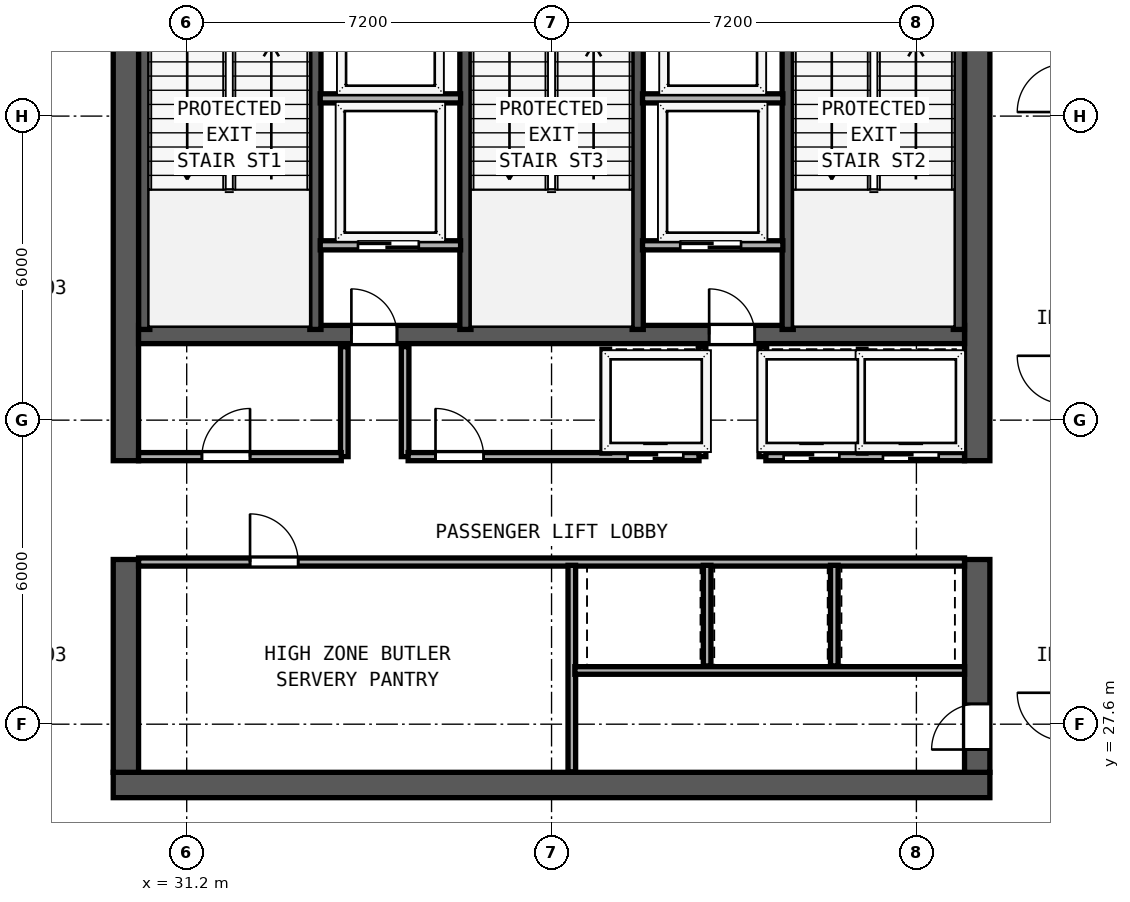
"""IFC4 building model, lengths in metres.
Left out: names, types, materials, properties, quantities, classifications, styles, units other than length and angle.
Written with IfcOpenShell. Run it as: python <this file> out.ifc"""

import sys

from ifc_helpers import new_model, si_unit, direction, frame, frame_2d, origin, place, context, subcontext, project, spatial, rectangle, extrude, element, fill, save


model = new_model("IFC4")
c1 = context("Model", 3, precision=1e-05, world=origin(), true_north=direction((0.0, 1.0)))
c2 = subcontext(c1, "Body", "Model", "MODEL_VIEW")
j1 = project(units=[si_unit("LENGTHUNIT", "METRE"), si_unit("PLANEANGLEUNIT", "RADIAN")], contexts=[c1])
p1 = place(None, origin())
s1 = spatial("IfcSite", under=j1, at=p1, CompositionType="ELEMENT")
p2 = place(p1, origin())
s2 = spatial("IfcBuilding", under=s1, at=p2, CompositionType="ELEMENT")
p3 = place(p2, frame((0.0, 0.0, 301.7)))
s3 = spatial("IfcBuildingStorey", under=s2, at=p3, CompositionType="ELEMENT", Elevation=301.7)
p4 = place(p3, frame((29.75, 26.4, 0.0), z_axis=(0.0, 0.0, 1.0), x_axis=(1.0, 0.0, 0.0)))
e1 = element("IfcWall", 1, at=p4, inside=s3, PredefinedType="SHEAR", context=c2, shape_type="SweptSolid", body=[
    extrude(rectangle(XDim=17.3, YDim=0.5, at=frame_2d((8.65, 0.0))), origin(), (0.0, 0.0, 1.0), 3.72),
])
p5 = place(p3, frame((30.0, 26.65, 0.0), z_axis=(0.0, 0.0, 1.0), x_axis=(0.0, 1.0, 0.0)))
e2 = element("IfcWall", 2, at=p5, inside=s3, PredefinedType="SHEAR", context=c2, shape_type="SweptSolid", body=[
    extrude(rectangle(XDim=4.2, YDim=0.5, at=frame_2d((2.1, 0.0))), origin(), (0.0, 0.0, 1.0), 3.72),
])
p6 = place(p3, frame((30.0, 32.8, 0.0), z_axis=(0.0, 0.0, 1.0), x_axis=(0.0, 1.0, 0.0)))
e3 = element("IfcWall", 3, at=p6, inside=s3, PredefinedType="SHEAR", context=c2, shape_type="SweptSolid", body=[
    extrude(rectangle(XDim=10.15, YDim=0.5, at=frame_2d((5.075, 0.0))), origin(), (0.0, 0.0, 1.0), 3.72),
])
p7 = place(p3, frame((46.8, 26.65, 0.0), z_axis=(0.0, 0.0, 1.0), x_axis=(0.0, 1.0, 0.0)))
e4 = element("IfcWall", 4, at=p7, inside=s3, PredefinedType="SHEAR", context=c2, shape_type="SweptSolid", body=[
    extrude(rectangle(XDim=4.2, YDim=0.5, at=frame_2d((2.1, 0.0))), origin(), (0.0, 0.0, 1.0), 3.72),
])
p8 = place(p7, frame((1.35, 0.0, 0.0), z_axis=(0.0, 0.0, 1.0), x_axis=(-1.0, 0.0, 0.0)))
e5 = element("IfcOpeningElement", 5, at=p8, cuts=e4, PredefinedType="OPENING", context=c2, shape_type="SweptSolid", body=[
    extrude(rectangle(XDim=0.9, YDim=2.1, at=frame_2d((0.45, 1.05))), frame((0.0, 0.26, 0.0), z_axis=(0.0, -1.0, 0.0), x_axis=(1.0, 0.0, 0.0)), (0.0, 0.0, 1.0), 0.52),
])
p9 = place(p3, frame((46.8, 32.8, 0.0), z_axis=(0.0, 0.0, 1.0), x_axis=(0.0, 1.0, 0.0)))
e6 = element("IfcWall", 6, at=p9, inside=s3, PredefinedType="SHEAR", context=c2, shape_type="SweptSolid", body=[
    extrude(rectangle(XDim=10.15, YDim=0.5, at=frame_2d((5.075, 0.0))), origin(), (0.0, 0.0, 1.0), 3.72),
])
p10 = place(p3, frame((30.25, 35.29, 0.0), z_axis=(0.0, 0.0, 1.0), x_axis=(1.0, 0.0, 0.0)))
e7 = element("IfcWall", 7, at=p10, inside=s3, PredefinedType="SHEAR", context=c2, shape_type="SweptSolid", body=[
    extrude(rectangle(XDim=16.3, YDim=0.36, at=frame_2d((8.15, 0.0))), origin(), (0.0, 0.0, 1.0), 3.72),
])
p11 = place(p10, frame((5.1, 0.0, 0.0), z_axis=(0.0, 0.0, 1.0), x_axis=(-1.0, 0.0, 0.0)))
e8 = element("IfcOpeningElement", 8, at=p11, cuts=e7, PredefinedType="OPENING", context=c2, shape_type="SweptSolid", body=[
    extrude(rectangle(XDim=0.9, YDim=2.1, at=frame_2d((0.45, 1.05))), frame((0.0, 0.19, 0.0), z_axis=(0.0, -1.0, 0.0), x_axis=(1.0, 0.0, 0.0)), (0.0, 0.0, 1.0), 0.38),
])
p12 = place(p10, frame((12.16, 0.0, 0.0), z_axis=(0.0, 0.0, 1.0), x_axis=(-1.0, 0.0, 0.0)))
e9 = element("IfcOpeningElement", 9, at=p12, cuts=e7, PredefinedType="OPENING", context=c2, shape_type="SweptSolid", body=[
    extrude(rectangle(XDim=0.9, YDim=2.1, at=frame_2d((0.45, 1.05))), frame((0.0, 0.19, 0.0), z_axis=(0.0, -1.0, 0.0), x_axis=(1.0, 0.0, 0.0)), (0.0, 0.0, 1.0), 0.38),
])
for number, where, z_axis, x_axis in (
    (10, (30.362, 35.39, 0.0), (0.0, 0.0, 1.0), (0.0, 1.0, 0.0)),
    (11, (33.74, 35.39, 0.0), (0.0, 0.0, 1.0), (0.0, 1.0, 0.0)),
    (12, (36.7, 35.39, 0.0), (0.0, 0.0, 1.0), (0.0, 1.0, 0.0)),
    (13, (40.1, 35.39, 0.0), (0.0, 0.0, 1.0), (0.0, 1.0, 0.0)),
    (14, (43.06, 35.39, 0.0), (0.0, 0.0, 1.0), (0.0, 1.0, 0.0)),
    (15, (46.438, 35.39, 0.0), (0.0, 0.0, 1.0), (0.0, 1.0, 0.0)),
):
    element("IfcWall", number, at=place(p3, frame(where, z_axis=z_axis, x_axis=x_axis)), inside=s3, PredefinedType="SHEAR", context=c2, shape_type="SweptSolid", body=[
        extrude(rectangle(XDim=7.56, YDim=0.22, at=frame_2d((3.78, 0.0))), origin(), (0.0, 0.0, 1.0), 3.72),
    ])
for number, where, z_axis, x_axis in (
    (16, (33.835, 39.95, 0.0), (0.0, 0.0, 1.0), (1.0, 0.0, 0.0)),
    (17, (40.195, 39.95, 0.0), (0.0, 0.0, 1.0), (1.0, 0.0, 0.0)),
):
    element("IfcWall", number, at=place(p3, frame(where, z_axis=z_axis, x_axis=x_axis)), inside=s3, PredefinedType="SOLIDWALL", context=c2, shape_type="SweptSolid", body=[
        extrude(rectangle(XDim=2.77, YDim=0.18, at=frame_2d((1.385, 0.0))), origin(), (0.0, 0.0, 1.0), 3.72),
    ])
p13 = place(p3, frame((33.835, 37.05, 0.0), z_axis=(0.0, 0.0, 1.0), x_axis=(1.0, 0.0, 0.0)))
e18 = element("IfcWall", 18, at=p13, inside=s3, PredefinedType="SOLIDWALL", context=c2, shape_type="SweptSolid", body=[
    extrude(rectangle(XDim=2.77, YDim=0.18, at=frame_2d((1.385, 0.0))), origin(), (0.0, 0.0, 1.0), 3.72),
])
p14 = place(p13, frame((1.945, 0.0, 0.0), z_axis=(0.0, 0.0, 1.0), x_axis=(-1.0, 0.0, 0.0)))
e19 = element("IfcOpeningElement", 19, at=p14, cuts=e18, PredefinedType="OPENING", context=c2, shape_type="SweptSolid", body=[
    extrude(rectangle(XDim=1.2, YDim=2.2, at=frame_2d((0.6, 1.1))), frame((0.0, 0.1, 0.0), z_axis=(0.0, -1.0, 0.0), x_axis=(1.0, 0.0, 0.0)), (0.0, 0.0, 1.0), 0.2),
])
for number, where, z_axis, x_axis in (
    (20, (34.31, 32.88, 0.0), (0.0, 0.0, 1.0), (0.0, 1.0, 0.0)),
    (21, (35.51, 32.88, 0.0), (0.0, 0.0, 1.0), (0.0, 1.0, 0.0)),
):
    element("IfcWall", number, at=place(p3, frame(where, z_axis=z_axis, x_axis=x_axis)), inside=s3, PredefinedType="SOLIDWALL", context=c2, shape_type="SweptSolid", body=[
        extrude(rectangle(XDim=2.17, YDim=0.15, at=frame_2d((1.085, 0.0))), origin(), (0.0, 0.0, 1.0), 3.72),
    ])
p15 = place(p3, frame((40.195, 37.05, 0.0), z_axis=(0.0, 0.0, 1.0), x_axis=(1.0, 0.0, 0.0)))
e22 = element("IfcWall", 22, at=p15, inside=s3, PredefinedType="SOLIDWALL", context=c2, shape_type="SweptSolid", body=[
    extrude(rectangle(XDim=2.77, YDim=0.18, at=frame_2d((1.385, 0.0))), origin(), (0.0, 0.0, 1.0), 3.72),
])
p16 = place(p15, frame((1.945, 0.0, 0.0), z_axis=(0.0, 0.0, 1.0), x_axis=(-1.0, 0.0, 0.0)))
e23 = element("IfcOpeningElement", 23, at=p16, cuts=e22, PredefinedType="OPENING", context=c2, shape_type="SweptSolid", body=[
    extrude(rectangle(XDim=1.2, YDim=2.2, at=frame_2d((0.6, 1.1))), frame((0.0, 0.1, 0.0), z_axis=(0.0, -1.0, 0.0), x_axis=(1.0, 0.0, 0.0)), (0.0, 0.0, 1.0), 0.2),
])
for number, where, z_axis, x_axis in (
    (24, (41.37, 32.88, 0.0), (0.0, 0.0, 1.0), (0.0, 1.0, 0.0)),
    (25, (42.57, 32.88, 0.0), (0.0, 0.0, 1.0), (0.0, 1.0, 0.0)),
):
    element("IfcWall", number, at=place(p3, frame(where, z_axis=z_axis, x_axis=x_axis)), inside=s3, PredefinedType="SOLIDWALL", context=c2, shape_type="SweptSolid", body=[
        extrude(rectangle(XDim=2.17, YDim=0.15, at=frame_2d((1.085, 0.0))), origin(), (0.0, 0.0, 1.0), 3.72),
    ])
p17 = place(p3, frame((30.25, 32.88, 0.0), z_axis=(0.0, 0.0, 1.0), x_axis=(1.0, 0.0, 0.0)))
e26 = element("IfcWall", 26, at=p17, inside=s3, PredefinedType="SOLIDWALL", context=c2, shape_type="SweptSolid", body=[
    extrude(rectangle(XDim=4.0, YDim=0.16, at=frame_2d((2.0, 0.0))), origin(), (0.0, 0.0, 1.0), 3.72),
])
p18 = place(p17, frame((2.2, 0.0, 0.0), z_axis=(0.0, 0.0, 1.0), x_axis=(-1.0, 0.0, 0.0)))
e27 = element("IfcOpeningElement", 27, at=p18, cuts=e26, PredefinedType="OPENING", context=c2, shape_type="SweptSolid", body=[
    extrude(rectangle(XDim=0.95, YDim=2.12, at=frame_2d((0.475, 1.06))), frame((0.0, 0.09, 0.0), z_axis=(0.0, -1.0, 0.0), x_axis=(1.0, 0.0, 0.0)), (0.0, 0.0, 1.0), 0.18),
])
p19 = place(p3, frame((35.57, 32.88, 0.0), z_axis=(0.0, 0.0, 1.0), x_axis=(1.0, 0.0, 0.0)))
e28 = element("IfcWall", 28, at=p19, inside=s3, PredefinedType="SOLIDWALL", context=c2, shape_type="SweptSolid", body=[
    extrude(rectangle(XDim=5.74, YDim=0.16, at=frame_2d((2.87, 0.0))), origin(), (0.0, 0.0, 1.0), 3.72),
])
p20 = place(p19, frame((1.49, 0.0, 0.0), z_axis=(0.0, 0.0, 1.0), x_axis=(-1.0, 0.0, 0.0)))
e29 = element("IfcOpeningElement", 29, at=p20, cuts=e28, PredefinedType="OPENING", context=c2, shape_type="SweptSolid", body=[
    extrude(rectangle(XDim=0.95, YDim=2.12, at=frame_2d((0.475, 1.06))), frame((0.0, 0.09, 0.0), z_axis=(0.0, -1.0, 0.0), x_axis=(1.0, 0.0, 0.0)), (0.0, 0.0, 1.0), 0.18),
])
p21 = place(p19, frame((5.43, 0.0, 0.0), z_axis=(0.0, 0.0, 1.0), x_axis=(-1.0, 0.0, 0.0)))
e30 = element("IfcOpeningElement", 30, at=p21, cuts=e28, PredefinedType="OPENING", context=c2, shape_type="SweptSolid", body=[
    extrude(rectangle(XDim=1.1, YDim=2.2, at=frame_2d((0.55, 1.1))), frame((0.0, 0.09, 0.0), z_axis=(0.0, -1.0, 0.0), x_axis=(1.0, 0.0, 0.0)), (0.0, 0.0, 1.0), 0.18),
])
p22 = place(p3, frame((42.63, 32.88, 0.0), z_axis=(0.0, 0.0, 1.0), x_axis=(1.0, 0.0, 0.0)))
e31 = element("IfcWall", 31, at=p22, inside=s3, PredefinedType="SOLIDWALL", context=c2, shape_type="SweptSolid", body=[
    extrude(rectangle(XDim=3.92, YDim=0.16, at=frame_2d((1.96, 0.0))), origin(), (0.0, 0.0, 1.0), 3.72),
])
p23 = place(p22, frame((1.45, 0.0, 0.0), z_axis=(0.0, 0.0, 1.0), x_axis=(-1.0, 0.0, 0.0)))
e32 = element("IfcOpeningElement", 32, at=p23, cuts=e31, PredefinedType="OPENING", context=c2, shape_type="SweptSolid", body=[
    extrude(rectangle(XDim=1.1, YDim=2.2, at=frame_2d((0.55, 1.1))), frame((0.0, 0.09, 0.0), z_axis=(0.0, -1.0, 0.0), x_axis=(1.0, 0.0, 0.0)), (0.0, 0.0, 1.0), 0.18),
])
p24 = place(p22, frame((3.41, 0.0, 0.0), z_axis=(0.0, 0.0, 1.0), x_axis=(-1.0, 0.0, 0.0)))
e33 = element("IfcOpeningElement", 33, at=p24, cuts=e31, PredefinedType="OPENING", context=c2, shape_type="SweptSolid", body=[
    extrude(rectangle(XDim=1.1, YDim=2.2, at=frame_2d((0.55, 1.1))), frame((0.0, 0.09, 0.0), z_axis=(0.0, -1.0, 0.0), x_axis=(1.0, 0.0, 0.0)), (0.0, 0.0, 1.0), 0.18),
])
for number, where, z_axis, x_axis in (
    (34, (39.47, 32.95, 0.0), (0.0, 0.0, 1.0), (0.0, 1.0, 0.0)),
    (35, (44.53, 32.95, 0.0), (0.0, 0.0, 1.0), (0.0, 1.0, 0.0)),
):
    element("IfcWall", number, at=place(p3, frame(where, z_axis=z_axis, x_axis=x_axis)), inside=s3, PredefinedType="SOLIDWALL", context=c2, shape_type="SweptSolid", body=[
        extrude(rectangle(XDim=2.05, YDim=0.15, at=frame_2d((1.025, 0.0))), origin(), (0.0, 0.0, 1.0), 3.72),
    ])
p25 = place(p3, frame((30.25, 30.8, 0.0), z_axis=(0.0, 0.0, 1.0), x_axis=(1.0, 0.0, 0.0)))
e36 = element("IfcWall", 36, at=p25, inside=s3, PredefinedType="SOLIDWALL", context=c2, shape_type="SweptSolid", body=[
    extrude(rectangle(XDim=16.3, YDim=0.16, at=frame_2d((8.15, 0.0))), origin(), (0.0, 0.0, 1.0), 3.72),
])
p26 = place(p25, frame((2.2, 0.0, 0.0)))
e37 = element("IfcOpeningElement", 37, at=p26, cuts=e36, PredefinedType="OPENING", context=c2, shape_type="SweptSolid", body=[
    extrude(rectangle(XDim=0.95, YDim=2.12, at=frame_2d((0.475, 1.06))), frame((0.0, 0.09, 0.0), z_axis=(0.0, -1.0, 0.0), x_axis=(1.0, 0.0, 0.0)), (0.0, 0.0, 1.0), 0.18),
])
p27 = place(p3, frame((38.8, 26.66, 0.0), z_axis=(0.0, 0.0, 1.0), x_axis=(0.0, 1.0, 0.0)))
e38 = element("IfcWall", 38, at=p27, inside=s3, PredefinedType="SOLIDWALL", context=c2, shape_type="SweptSolid", body=[
    extrude(rectangle(XDim=4.075, YDim=0.15, at=frame_2d((2.038, 0.0))), origin(), (0.0, 0.0, 1.0), 3.72),
])
p28 = place(p3, frame((38.86, 28.66, 0.0), z_axis=(0.0, 0.0, 1.0), x_axis=(1.0, 0.0, 0.0)))
e39 = element("IfcWall", 39, at=p28, inside=s3, PredefinedType="PARTITIONING", context=c2, shape_type="SweptSolid", body=[
    extrude(rectangle(XDim=7.69, YDim=0.15, at=frame_2d((3.845, 0.0))), origin(), (0.0, 0.0, 1.0), 3.72),
])
for number, where, z_axis, x_axis in (
    (40, (41.47, 28.75, 0.0), (0.0, 0.0, 1.0), (0.0, 1.0, 0.0)),
    (41, (43.98, 28.75, 0.0), (0.0, 0.0, 1.0), (0.0, 1.0, 0.0)),
):
    element("IfcWall", number, at=place(p3, frame(where, z_axis=z_axis, x_axis=x_axis)), inside=s3, PredefinedType="SOLIDWALL", context=c2, shape_type="SweptSolid", body=[
        extrude(rectangle(XDim=1.985, YDim=0.15, at=frame_2d((0.993, 0.0))), origin(), (0.0, 0.0, 1.0), 3.72),
    ])
p29 = place(p14, origin())
e42 = element("IfcDoor", 42, at=p29, inside=s3, OperationType="SLIDING_TO_RIGHT", PredefinedType="DOOR", context=c2, shape_type="SweptSolid", body=[
    extrude(rectangle(XDim=1.2, YDim=2.2, at=frame_2d((0.6, 1.1))), frame((0.0, 0.025, 0.0), z_axis=(0.0, -1.0, 0.0), x_axis=(1.0, 0.0, 0.0)), (0.0, 0.0, 1.0), 0.05),
])
fill(e19, e42)
p30 = place(p11, origin())
e43 = element("IfcDoor", 43, at=p30, inside=s3, OperationType="SINGLE_SWING_RIGHT", PredefinedType="DOOR", context=c2, shape_type="SweptSolid", body=[
    extrude(rectangle(XDim=0.9, YDim=2.1, at=frame_2d((0.45, 1.05))), frame((0.0, 0.025, 0.0), z_axis=(0.0, -1.0, 0.0), x_axis=(1.0, 0.0, 0.0)), (0.0, 0.0, 1.0), 0.05),
])
fill(e8, e43)
p31 = place(p16, origin())
e44 = element("IfcDoor", 44, at=p31, inside=s3, OperationType="SLIDING_TO_RIGHT", PredefinedType="DOOR", context=c2, shape_type="SweptSolid", body=[
    extrude(rectangle(XDim=1.2, YDim=2.2, at=frame_2d((0.6, 1.1))), frame((0.0, 0.025, 0.0), z_axis=(0.0, -1.0, 0.0), x_axis=(1.0, 0.0, 0.0)), (0.0, 0.0, 1.0), 0.05),
])
fill(e23, e44)
p32 = place(p12, origin())
e45 = element("IfcDoor", 45, at=p32, inside=s3, OperationType="SINGLE_SWING_RIGHT", PredefinedType="DOOR", context=c2, shape_type="SweptSolid", body=[
    extrude(rectangle(XDim=0.9, YDim=2.1, at=frame_2d((0.45, 1.05))), frame((0.0, 0.025, 0.0), z_axis=(0.0, -1.0, 0.0), x_axis=(1.0, 0.0, 0.0)), (0.0, 0.0, 1.0), 0.05),
])
fill(e9, e45)
p33 = place(p18, origin())
e46 = element("IfcDoor", 46, at=p33, inside=s3, OperationType="SINGLE_SWING_LEFT", PredefinedType="DOOR", context=c2, shape_type="SweptSolid", body=[
    extrude(rectangle(XDim=0.95, YDim=2.12, at=frame_2d((0.475, 1.06))), frame((0.0, 0.025, 0.0), z_axis=(0.0, -1.0, 0.0), x_axis=(1.0, 0.0, 0.0)), (0.0, 0.0, 1.0), 0.05),
])
fill(e27, e46)
p34 = place(p20, origin())
e47 = element("IfcDoor", 47, at=p34, inside=s3, OperationType="SINGLE_SWING_RIGHT", PredefinedType="DOOR", context=c2, shape_type="SweptSolid", body=[
    extrude(rectangle(XDim=0.95, YDim=2.12, at=frame_2d((0.475, 1.06))), frame((0.0, 0.025, 0.0), z_axis=(0.0, -1.0, 0.0), x_axis=(1.0, 0.0, 0.0)), (0.0, 0.0, 1.0), 0.05),
])
fill(e29, e47)
p35 = place(p21, origin())
e48 = element("IfcDoor", 48, at=p35, inside=s3, OperationType="SLIDING_TO_RIGHT", PredefinedType="DOOR", context=c2, shape_type="SweptSolid", body=[
    extrude(rectangle(XDim=1.1, YDim=2.2, at=frame_2d((0.55, 1.1))), frame((0.0, 0.025, 0.0), z_axis=(0.0, -1.0, 0.0), x_axis=(1.0, 0.0, 0.0)), (0.0, 0.0, 1.0), 0.05),
])
fill(e30, e48)
p36 = place(p23, origin())
e49 = element("IfcDoor", 49, at=p36, inside=s3, OperationType="SLIDING_TO_RIGHT", PredefinedType="DOOR", context=c2, shape_type="SweptSolid", body=[
    extrude(rectangle(XDim=1.1, YDim=2.2, at=frame_2d((0.55, 1.1))), frame((0.0, 0.025, 0.0), z_axis=(0.0, -1.0, 0.0), x_axis=(1.0, 0.0, 0.0)), (0.0, 0.0, 1.0), 0.05),
])
fill(e32, e49)
p37 = place(p24, origin())
e50 = element("IfcDoor", 50, at=p37, inside=s3, OperationType="SLIDING_TO_RIGHT", PredefinedType="DOOR", context=c2, shape_type="SweptSolid", body=[
    extrude(rectangle(XDim=1.1, YDim=2.2, at=frame_2d((0.55, 1.1))), frame((0.0, 0.025, 0.0), z_axis=(0.0, -1.0, 0.0), x_axis=(1.0, 0.0, 0.0)), (0.0, 0.0, 1.0), 0.05),
])
fill(e33, e50)
p38 = place(p26, origin())
e51 = element("IfcDoor", 51, at=p38, inside=s3, OperationType="SINGLE_SWING_LEFT", PredefinedType="DOOR", context=c2, shape_type="SweptSolid", body=[
    extrude(rectangle(XDim=0.95, YDim=2.12, at=frame_2d((0.475, 1.06))), frame((0.0, 0.025, 0.0), z_axis=(0.0, -1.0, 0.0), x_axis=(1.0, 0.0, 0.0)), (0.0, 0.0, 1.0), 0.05),
])
fill(e37, e51)
p39 = place(p8, origin())
e52 = element("IfcDoor", 52, at=p39, inside=s3, OperationType="SINGLE_SWING_RIGHT", PredefinedType="DOOR", context=c2, shape_type="SweptSolid", body=[
    extrude(rectangle(XDim=0.9, YDim=2.1, at=frame_2d((0.45, 1.05))), frame((0.0, -0.135, 0.0), z_axis=(0.0, -1.0, 0.0), x_axis=(1.0, 0.0, 0.0)), (0.0, 0.0, 1.0), 0.05),
])
fill(e5, e52)
save(model, sys.argv[1])
